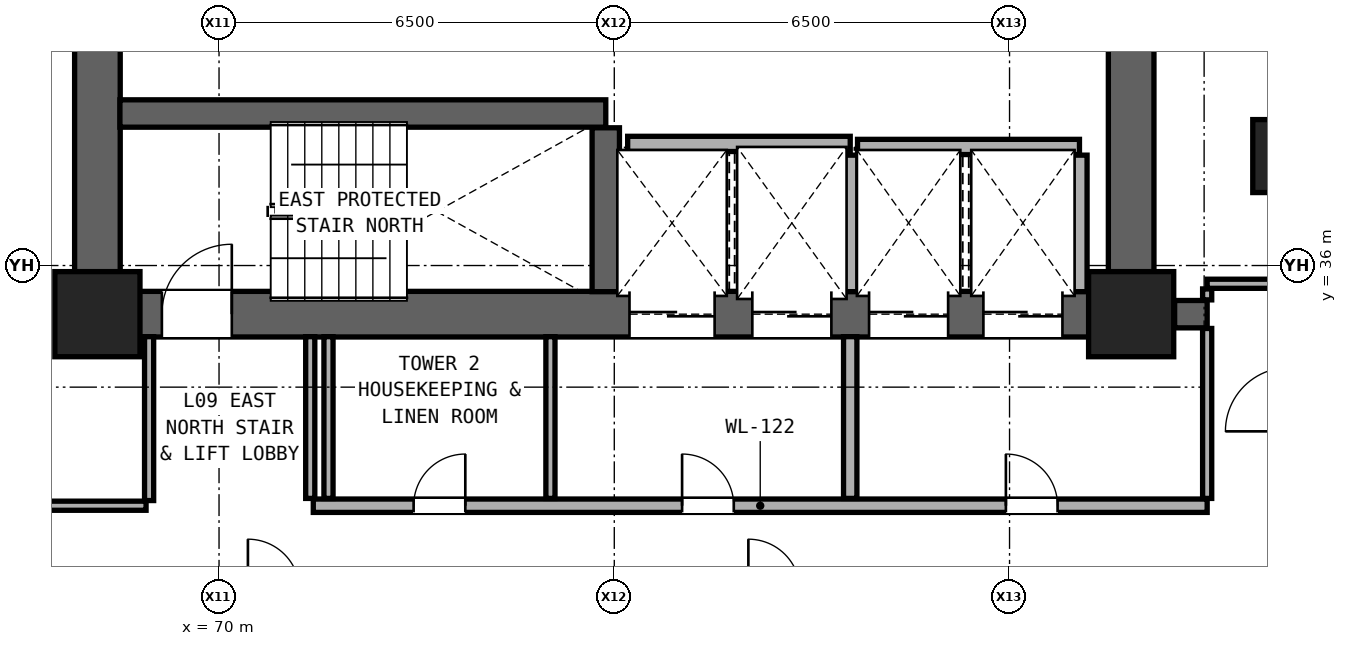
"""IFC4 building model, lengths in metres.
Left out: names, types, materials, properties, quantities, classifications, styles, units other than length and angle.
Written with IfcOpenShell. Run it as: python <this file> out.ifc"""

import sys

from ifc_helpers import new_model, si_unit, direction, frame, frame_2d, origin, origin_2d, place, context, subcontext, project, spatial, rectangle, extrude, element, fill, save


model = new_model("IFC4")
c1 = context("Model", 3, precision=1e-05, world=origin(), true_north=direction((0.0, 1.0)))
c2 = subcontext(c1, "Body", "Model", "MODEL_VIEW")
j1 = project(units=[si_unit("LENGTHUNIT", "METRE"), si_unit("PLANEANGLEUNIT", "RADIAN")], contexts=[c1])
p1 = place(None, origin())
s1 = spatial("IfcSite", under=j1, at=p1, CompositionType="ELEMENT")
p2 = place(p1, origin())
s2 = spatial("IfcBuilding", under=s1, at=p2, CompositionType="ELEMENT")
p3 = place(p2, frame((0.0, 0.0, 35.6)))
s3 = spatial("IfcBuildingStorey", under=s2, at=p3, CompositionType="ELEMENT", Elevation=35.6)
for number, where, z_axis, x_axis in (
    (1, (68.0, 35.2, 0.0), (0.0, 0.0, 1.0), (1.0, 0.0, 0.0)),
    (2, (85.0, 35.2, 0.0), (0.0, 0.0, 1.0), (1.0, 0.0, 0.0)),
):
    element("IfcColumn", number, at=place(p3, frame(where, z_axis=z_axis, x_axis=x_axis)), inside=s3, PredefinedType="COLUMN", context=c2, shape_type="SweptSolid", body=[
        extrude(rectangle(XDim=1.4, YDim=1.4, at=origin_2d()), origin(), (0.0, 0.0, 1.0), 3.3),
    ])
p4 = place(p3, frame((87.4, 37.8, 0.0), z_axis=(0.0, 0.0, 1.0), x_axis=(1.0, 0.0, 0.0)))
e3 = element("IfcColumn", 3, at=p4, inside=s3, PredefinedType="PILASTER", context=c2, shape_type="SweptSolid", body=[
    extrude(rectangle(XDim=0.8, YDim=1.2, at=origin_2d()), origin(), (0.0, 0.0, 1.0), 3.3),
])
for number, where, z_axis, x_axis in (
    (4, (68.0, 35.2, 0.0), (0.0, 0.0, 1.0), (0.0, 1.0, 0.0)),
    (5, (85.0, 35.2, 0.0), (0.0, 0.0, 1.0), (0.0, 1.0, 0.0)),
):
    element("IfcWall", number, at=place(p3, frame(where, z_axis=z_axis, x_axis=x_axis)), inside=s3, PredefinedType="SHEAR", context=c2, shape_type="SweptSolid", body=[
        extrude(rectangle(XDim=5.6, YDim=0.75, at=frame_2d((2.8, 0.0))), origin(), (0.0, 0.0, 1.0), 3.06),
    ])
p5 = place(p3, frame((68.0, 35.2, 0.0), z_axis=(0.0, 0.0, 1.0), x_axis=(1.0, 0.0, 0.0)))
e6 = element("IfcWall", 6, at=p5, inside=s3, PredefinedType="SHEAR", context=c2, shape_type="SweptSolid", body=[
    extrude(rectangle(XDim=17.0, YDim=0.75, at=frame_2d((8.5, 0.0))), origin(), (0.0, 0.0, 1.0), 3.06),
])
p6 = place(p5, frame((1.06, 0.0, 0.0)))
e7 = element("IfcOpeningElement", 7, at=p6, cuts=e6, PredefinedType="OPENING", context=c2, shape_type="SweptSolid", body=[
    extrude(rectangle(XDim=1.15, YDim=2.2, at=frame_2d((0.575, 1.1))), frame((0.0, 0.385, 0.0), z_axis=(0.0, -1.0, 0.0), x_axis=(1.0, 0.0, 0.0)), (0.0, 0.0, 1.0), 0.77),
])
p7 = place(p5, frame((8.75, 0.0, 0.0)))
e8 = element("IfcOpeningElement", 8, at=p7, cuts=e6, PredefinedType="OPENING", context=c2, shape_type="SweptSolid", body=[
    extrude(rectangle(XDim=1.4, YDim=2.35, at=frame_2d((0.7, 1.175))), frame((0.0, 0.385, 0.0), z_axis=(0.0, -1.0, 0.0), x_axis=(1.0, 0.0, 0.0)), (0.0, 0.0, 1.0), 0.77),
])
p8 = place(p5, frame((10.77, 0.0, 0.0)))
e9 = element("IfcOpeningElement", 9, at=p8, cuts=e6, PredefinedType="OPENING", context=c2, shape_type="SweptSolid", body=[
    extrude(rectangle(XDim=1.3, YDim=2.3, at=frame_2d((0.65, 1.15))), frame((0.0, 0.385, 0.0), z_axis=(0.0, -1.0, 0.0), x_axis=(1.0, 0.0, 0.0)), (0.0, 0.0, 1.0), 0.77),
])
p9 = place(p5, frame((12.69, 0.0, 0.0)))
e10 = element("IfcOpeningElement", 10, at=p9, cuts=e6, PredefinedType="OPENING", context=c2, shape_type="SweptSolid", body=[
    extrude(rectangle(XDim=1.3, YDim=2.3, at=frame_2d((0.65, 1.15))), frame((0.0, 0.385, 0.0), z_axis=(0.0, -1.0, 0.0), x_axis=(1.0, 0.0, 0.0)), (0.0, 0.0, 1.0), 0.77),
])
p10 = place(p5, frame((14.57, 0.0, 0.0)))
e11 = element("IfcOpeningElement", 11, at=p10, cuts=e6, PredefinedType="OPENING", context=c2, shape_type="SweptSolid", body=[
    extrude(rectangle(XDim=1.3, YDim=2.3, at=frame_2d((0.65, 1.15))), frame((0.0, 0.385, 0.0), z_axis=(0.0, -1.0, 0.0), x_axis=(1.0, 0.0, 0.0)), (0.0, 0.0, 1.0), 0.77),
])
p11 = place(p3, frame((66.62, 32.05, 0.0), z_axis=(0.0, 0.0, 1.0), x_axis=(1.0, 0.0, 0.0)))
e12 = element("IfcWall", 12, at=p11, inside=s3, PredefinedType="PARTITIONING", context=c2, shape_type="SweptSolid", body=[
    extrude(rectangle(XDim=2.18, YDim=0.15, at=frame_2d((1.09, 0.0))), origin(), (0.0, 0.0, 1.0), 2.125),
])
p12 = place(p3, frame((71.55, 32.05, 0.0), z_axis=(0.0, 0.0, 1.0), x_axis=(1.0, 0.0, 0.0)))
e13 = element("IfcWall", 13, at=p12, inside=s3, PredefinedType="SOLIDWALL", context=c2, shape_type="SweptSolid", body=[
    extrude(rectangle(XDim=14.7, YDim=0.22, at=frame_2d((7.35, 0.0))), origin(), (0.0, 0.0, 1.0), 2.125),
])
p13 = place(p12, frame((11.39, 0.0, 0.0)))
e14 = element("IfcOpeningElement", 14, at=p13, cuts=e13, PredefinedType="OPENING", context=c2, shape_type="SweptSolid", body=[
    extrude(rectangle(XDim=0.85, YDim=2.01, at=frame_2d((0.425, 1.005))), frame((0.0, 0.12, 0.0), z_axis=(0.0, -1.0, 0.0), x_axis=(1.0, 0.0, 0.0)), (0.0, 0.0, 1.0), 0.24),
])
p14 = place(p12, frame((6.065, 0.0, 0.0)))
e15 = element("IfcOpeningElement", 15, at=p14, cuts=e13, PredefinedType="OPENING", context=c2, shape_type="SweptSolid", body=[
    extrude(rectangle(XDim=0.85, YDim=2.01, at=frame_2d((0.425, 1.005))), frame((0.0, 0.12, 0.0), z_axis=(0.0, -1.0, 0.0), x_axis=(1.0, 0.0, 0.0)), (0.0, 0.0, 1.0), 0.24),
])
p15 = place(p12, frame((1.65, 0.0, 0.0)))
e16 = element("IfcOpeningElement", 16, at=p15, cuts=e13, PredefinedType="OPENING", context=c2, shape_type="SweptSolid", body=[
    extrude(rectangle(XDim=0.85, YDim=2.01, at=frame_2d((0.425, 1.005))), frame((0.0, 0.12, 0.0), z_axis=(0.0, -1.0, 0.0), x_axis=(1.0, 0.0, 0.0)), (0.0, 0.0, 1.0), 0.24),
])
p16 = place(p3, frame((85.715, 35.2, 0.0), z_axis=(0.0, 0.0, 1.0), x_axis=(1.0, 0.0, 0.0)))
e17 = element("IfcWall", 17, at=p16, inside=s3, PredefinedType="SHEAR", context=c2, shape_type="SweptSolid", body=[
    extrude(rectangle(XDim=0.535, YDim=0.45, at=frame_2d((0.268, 0.0))), origin(), (0.0, 0.0, 1.0), 3.06),
])
p17 = place(p3, frame((86.25, 35.7, 0.0), z_axis=(0.0, 0.0, 1.0), x_axis=(1.0, 0.0, 0.0)))
e18 = element("IfcWall", 18, at=p17, inside=s3, PredefinedType="PARTITIONING", context=c2, shape_type="SweptSolid", body=[
    extrude(rectangle(XDim=1.35, YDim=0.15, at=frame_2d((0.675, 0.0))), origin(), (0.0, 0.0, 1.0), 3.06),
])
p18 = place(p3, frame((80.5, 37.95, 0.0), z_axis=(0.0, 0.0, 1.0), x_axis=(1.0, 0.0, 0.0)))
e19 = element("IfcWall", 19, at=p18, inside=s3, PredefinedType="SOLIDWALL", context=c2, shape_type="SweptSolid", body=[
    extrude(rectangle(XDim=3.65, YDim=0.25, at=frame_2d((1.825, 0.0))), origin(), (0.0, 0.0, 1.0), 3.06),
])
p19 = place(p3, frame((76.72, 38.0, 0.0), z_axis=(0.0, 0.0, 1.0), x_axis=(1.0, 0.0, 0.0)))
e20 = element("IfcWall", 20, at=p19, inside=s3, PredefinedType="SOLIDWALL", context=c2, shape_type="SweptSolid", body=[
    extrude(rectangle(XDim=3.66, YDim=0.25, at=frame_2d((1.83, 0.0))), origin(), (0.0, 0.0, 1.0), 3.06),
])
p20 = place(p3, frame((68.37, 38.5, 0.0), z_axis=(0.0, 0.0, 1.0), x_axis=(1.0, 0.0, 0.0)))
e21 = element("IfcWall", 21, at=p20, inside=s3, PredefinedType="SHEAR", context=c2, shape_type="SweptSolid", body=[
    extrude(rectangle(XDim=7.99, YDim=0.45, at=frame_2d((3.995, 0.0))), origin(), (0.0, 0.0, 1.0), 3.06),
])
p21 = place(p3, frame((68.85, 32.135, 0.0), z_axis=(0.0, 0.0, 1.0), x_axis=(0.0, 1.0, 0.0)))
e22 = element("IfcWall", 22, at=p21, inside=s3, PredefinedType="PARTITIONING", context=c2, shape_type="SweptSolid", body=[
    extrude(rectangle(XDim=2.695, YDim=0.15, at=frame_2d((1.348, 0.0))), origin(), (0.0, 0.0, 1.0), 3.06),
])
for number, where, z_axis, x_axis in (
    (23, (71.5, 32.17, 0.0), (0.0, 0.0, 1.0), (0.0, 1.0, 0.0)),
    (24, (71.8, 32.17, 0.0), (0.0, 0.0, 1.0), (0.0, 1.0, 0.0)),
    (25, (75.45, 32.17, 0.0), (0.0, 0.0, 1.0), (0.0, 1.0, 0.0)),
):
    element("IfcWall", number, at=place(p3, frame(where, z_axis=z_axis, x_axis=x_axis)), inside=s3, PredefinedType="PARTITIONING", context=c2, shape_type="SweptSolid", body=[
        extrude(rectangle(XDim=2.66, YDim=0.15, at=frame_2d((1.33, 0.0))), origin(), (0.0, 0.0, 1.0), 3.06),
    ])
p22 = place(p3, frame((76.36, 35.57, 0.0), z_axis=(0.0, 0.0, 1.0), x_axis=(0.0, 1.0, 0.0)))
e26 = element("IfcWall", 26, at=p22, inside=s3, PredefinedType="SHEAR", context=c2, shape_type="SweptSolid", body=[
    extrude(rectangle(XDim=2.695, YDim=0.45, at=frame_2d((1.347, 0.0))), origin(), (0.0, 0.0, 1.0), 3.06),
])
p23 = place(p3, frame((80.38, 32.17, 0.0), z_axis=(0.0, 0.0, 1.0), x_axis=(0.0, 1.0, 0.0)))
e27 = element("IfcWall", 27, at=p23, inside=s3, PredefinedType="SOLIDWALL", context=c2, shape_type="SweptSolid", body=[
    extrude(rectangle(XDim=2.66, YDim=0.22, at=frame_2d((1.33, 0.0))), origin(), (0.0, 0.0, 1.0), 3.06),
])
for number, where, z_axis, x_axis in (
    (28, (80.38, 35.57, 0.0), (0.0, 0.0, 1.0), (0.0, 1.0, 0.0)),
    (29, (84.15, 35.57, 0.0), (0.0, 0.0, 1.0), (0.0, 1.0, 0.0)),
):
    element("IfcWall", number, at=place(p3, frame(where, z_axis=z_axis, x_axis=x_axis)), inside=s3, PredefinedType="SOLIDWALL", context=c2, shape_type="SweptSolid", body=[
        extrude(rectangle(XDim=2.245, YDim=0.25, at=frame_2d((1.123, 0.0))), origin(), (0.0, 0.0, 1.0), 3.06),
    ])
p24 = place(p3, frame((86.25, 32.17, 0.0), z_axis=(0.0, 0.0, 1.0), x_axis=(0.0, 1.0, 0.0)))
e30 = element("IfcWall", 30, at=p24, inside=s3, PredefinedType="PARTITIONING", context=c2, shape_type="SweptSolid", body=[
    extrude(rectangle(XDim=2.795, YDim=0.15, at=frame_2d((1.397, 0.0))), origin(), (0.0, 0.0, 1.0), 2.452),
])
p25 = place(p3, frame((86.25, 35.435, 0.0), z_axis=(0.0, 0.0, 1.0), x_axis=(0.0, 1.0, 0.0)))
e31 = element("IfcWall", 31, at=p25, inside=s3, PredefinedType="PARTITIONING", context=c2, shape_type="SweptSolid", body=[
    extrude(rectangle(XDim=0.18, YDim=0.15, at=frame_2d((0.09, 0.0))), origin(), (0.0, 0.0, 1.0), 2.452),
])
p26 = place(p13, origin())
e32 = element("IfcDoor", 32, at=p26, inside=s3, OperationType="SINGLE_SWING_LEFT", PredefinedType="DOOR", context=c2, shape_type="SweptSolid", body=[
    extrude(rectangle(XDim=0.85, YDim=2.01, at=frame_2d((0.425, 1.005))), frame((0.0, 0.025, 0.0), z_axis=(0.0, -1.0, 0.0), x_axis=(1.0, 0.0, 0.0)), (0.0, 0.0, 1.0), 0.05),
])
fill(e14, e32)
p27 = place(p6, origin())
e33 = element("IfcDoor", 33, at=p27, inside=s3, OperationType="SINGLE_SWING_RIGHT", PredefinedType="DOOR", context=c2, shape_type="SweptSolid", body=[
    extrude(rectangle(XDim=1.15, YDim=2.2, at=frame_2d((0.575, 1.1))), frame((0.0, 0.025, 0.0), z_axis=(0.0, -1.0, 0.0), x_axis=(1.0, 0.0, 0.0)), (0.0, 0.0, 1.0), 0.05),
])
fill(e7, e33)
p28 = place(p14, origin())
e34 = element("IfcDoor", 34, at=p28, inside=s3, OperationType="SINGLE_SWING_LEFT", PredefinedType="DOOR", context=c2, shape_type="SweptSolid", body=[
    extrude(rectangle(XDim=0.85, YDim=2.01, at=frame_2d((0.425, 1.005))), frame((0.0, 0.025, 0.0), z_axis=(0.0, -1.0, 0.0), x_axis=(1.0, 0.0, 0.0)), (0.0, 0.0, 1.0), 0.05),
])
fill(e15, e34)
p29 = place(p15, origin())
e35 = element("IfcDoor", 35, at=p29, inside=s3, OperationType="SINGLE_SWING_RIGHT", PredefinedType="DOOR", context=c2, shape_type="SweptSolid", body=[
    extrude(rectangle(XDim=0.85, YDim=2.01, at=frame_2d((0.425, 1.005))), frame((0.0, 0.025, 0.0), z_axis=(0.0, -1.0, 0.0), x_axis=(1.0, 0.0, 0.0)), (0.0, 0.0, 1.0), 0.05),
])
fill(e16, e35)
p30 = place(p7, origin())
e36 = element("IfcDoor", 36, at=p30, inside=s3, OperationType="DOUBLE_DOOR_SLIDING", PredefinedType="DOOR", context=c2, shape_type="SweptSolid", body=[
    extrude(rectangle(XDim=1.4, YDim=2.35, at=frame_2d((0.7, 1.175))), frame((0.0, 0.025, 0.0), z_axis=(0.0, -1.0, 0.0), x_axis=(1.0, 0.0, 0.0)), (0.0, 0.0, 1.0), 0.05),
])
fill(e8, e36)
p31 = place(p8, origin())
e37 = element("IfcDoor", 37, at=p31, inside=s3, OperationType="DOUBLE_DOOR_SLIDING", PredefinedType="DOOR", context=c2, shape_type="SweptSolid", body=[
    extrude(rectangle(XDim=1.3, YDim=2.3, at=frame_2d((0.65, 1.15))), frame((0.0, 0.025, 0.0), z_axis=(0.0, -1.0, 0.0), x_axis=(1.0, 0.0, 0.0)), (0.0, 0.0, 1.0), 0.05),
])
fill(e9, e37)
p32 = place(p9, origin())
e38 = element("IfcDoor", 38, at=p32, inside=s3, OperationType="DOUBLE_DOOR_SLIDING", PredefinedType="DOOR", context=c2, shape_type="SweptSolid", body=[
    extrude(rectangle(XDim=1.3, YDim=2.3, at=frame_2d((0.65, 1.15))), frame((0.0, 0.025, 0.0), z_axis=(0.0, -1.0, 0.0), x_axis=(1.0, 0.0, 0.0)), (0.0, 0.0, 1.0), 0.05),
])
fill(e10, e38)
p33 = place(p10, origin())
e39 = element("IfcDoor", 39, at=p33, inside=s3, OperationType="DOUBLE_DOOR_SLIDING", PredefinedType="DOOR", context=c2, shape_type="SweptSolid", body=[
    extrude(rectangle(XDim=1.3, YDim=2.3, at=frame_2d((0.65, 1.15))), frame((0.0, 0.025, 0.0), z_axis=(0.0, -1.0, 0.0), x_axis=(1.0, 0.0, 0.0)), (0.0, 0.0, 1.0), 0.05),
])
fill(e11, e39)
save(model, sys.argv[1])
